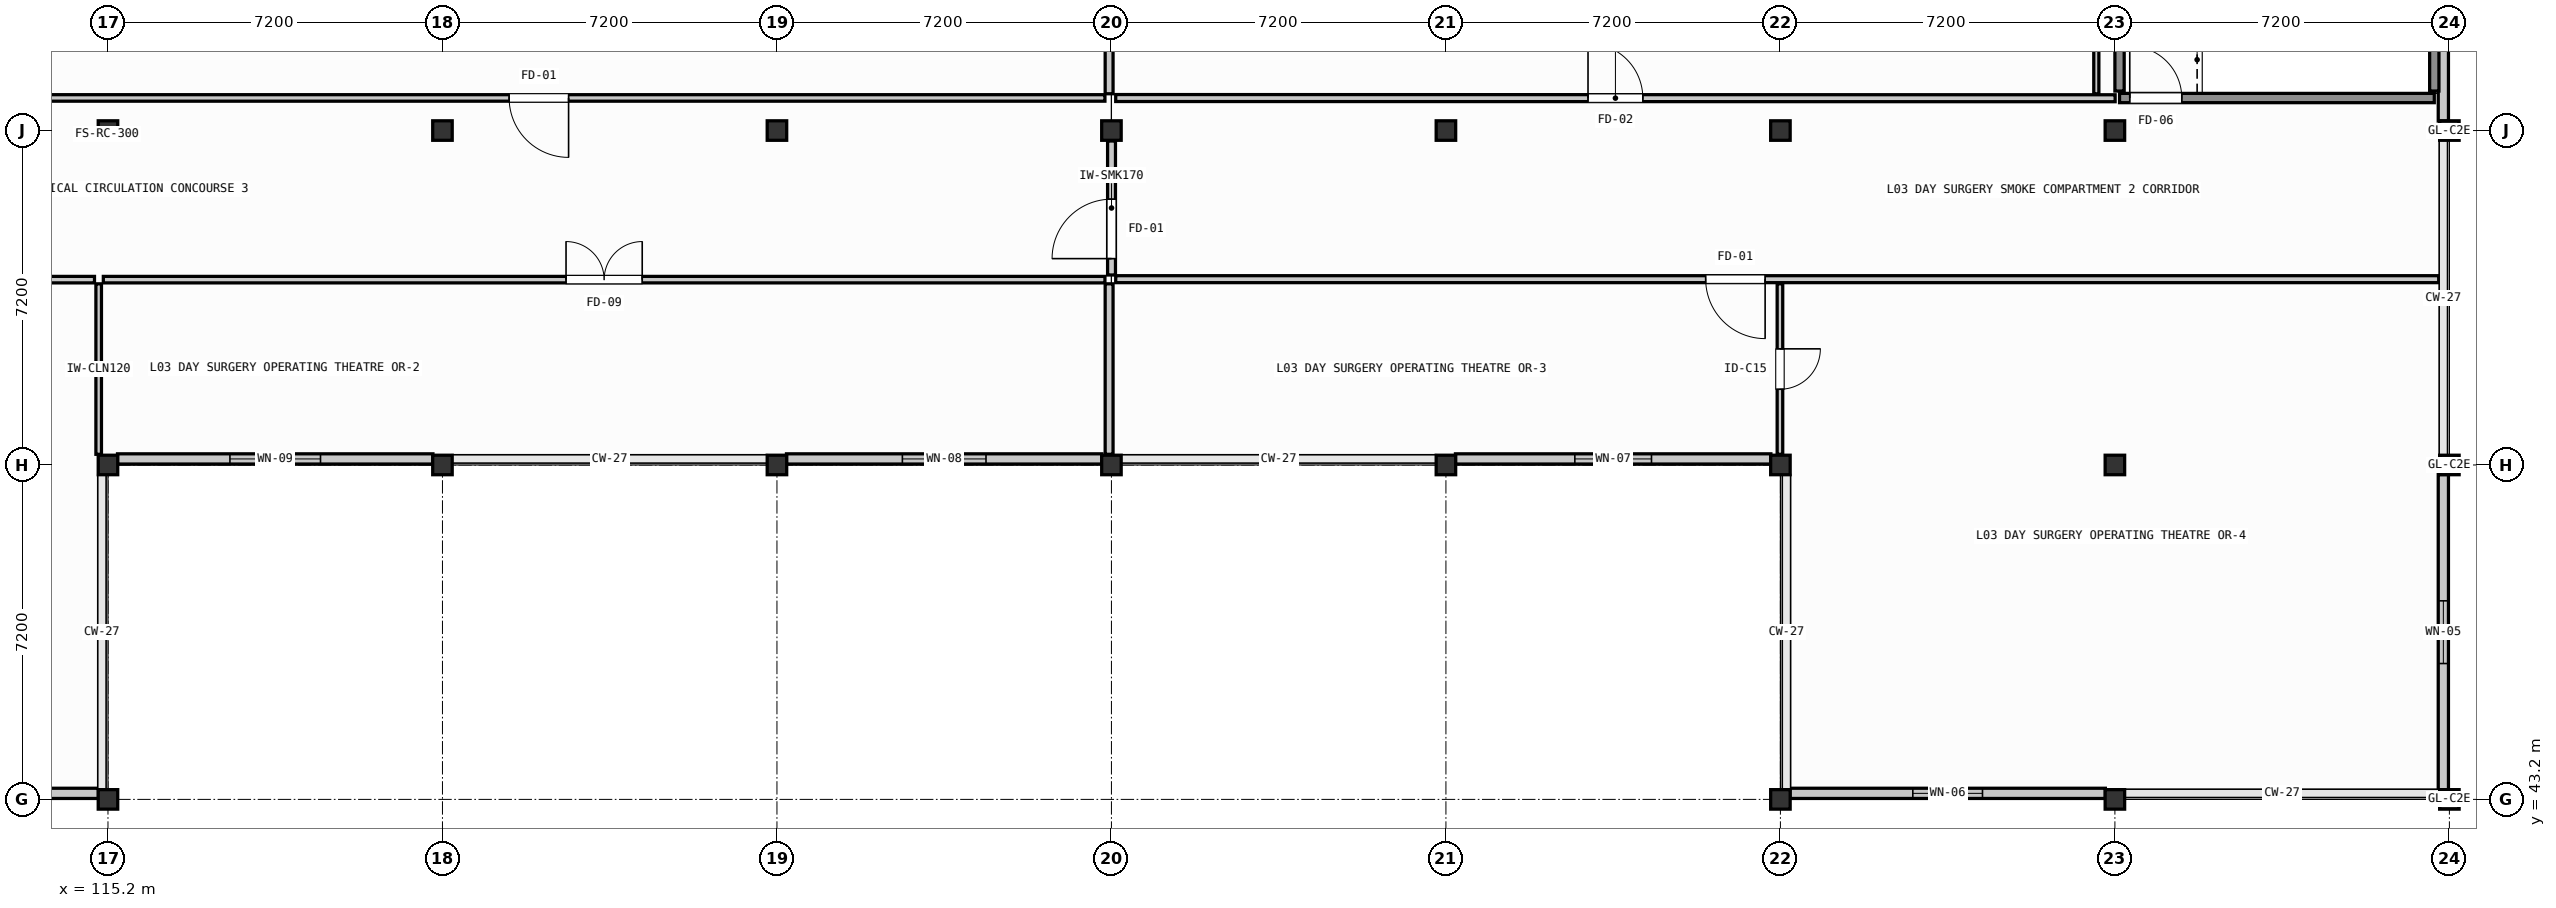
"""IFC4 building model, lengths in metres.
Left out: names, types, materials, properties, quantities, classifications, styles, units other than length and angle.
Written with IfcOpenShell. Run it as: python <this file> out.ifc"""

import sys

from ifc_helpers import new_model, si_unit, direction, frame, frame_2d, origin, origin_2d, place, context, subcontext, project, spatial, rectangle, extrude, element, fill, save


model = new_model("IFC4")
c1 = context("Model", 3, precision=1e-05, world=origin(), true_north=direction((0.0, 1.0)))
c2 = subcontext(c1, "Body", "Model", "MODEL_VIEW")
j1 = project(units=[si_unit("LENGTHUNIT", "METRE"), si_unit("PLANEANGLEUNIT", "RADIAN")], contexts=[c1])
p1 = place(None, origin())
s1 = spatial("IfcSite", under=j1, at=p1, CompositionType="ELEMENT")
p2 = place(p1, origin())
s2 = spatial("IfcBuilding", under=s1, at=p2, CompositionType="ELEMENT")
p3 = place(p2, frame((0.0, 0.0, 9.3)))
s3 = spatial("IfcBuildingStorey", under=s2, at=p3, CompositionType="ELEMENT", Elevation=9.3)
for number, where, z_axis, x_axis in (
    (1, (115.2, 43.2, 0.0), (0.0, 0.0, 1.0), (1.0, 0.0, 0.0)),
    (2, (115.2, 50.4, 0.0), (0.0, 0.0, 1.0), (1.0, 0.0, 0.0)),
    (3, (115.2, 57.6, 0.0), (0.0, 0.0, 1.0), (1.0, 0.0, 0.0)),
    (4, (122.4, 50.4, 0.0), (0.0, 0.0, 1.0), (1.0, 0.0, 0.0)),
    (5, (122.4, 57.6, 0.0), (0.0, 0.0, 1.0), (1.0, 0.0, 0.0)),
    (6, (129.6, 50.4, 0.0), (0.0, 0.0, 1.0), (1.0, 0.0, 0.0)),
    (7, (129.6, 57.6, 0.0), (0.0, 0.0, 1.0), (1.0, 0.0, 0.0)),
    (8, (136.8, 50.4, 0.0), (0.0, 0.0, 1.0), (1.0, 0.0, 0.0)),
    (9, (136.8, 57.6, 0.0), (0.0, 0.0, 1.0), (1.0, 0.0, 0.0)),
    (10, (144.0, 50.4, 0.0), (0.0, 0.0, 1.0), (1.0, 0.0, 0.0)),
    (11, (144.0, 57.6, 0.0), (0.0, 0.0, 1.0), (1.0, 0.0, 0.0)),
    (12, (151.2, 43.2, 0.0), (0.0, 0.0, 1.0), (1.0, 0.0, 0.0)),
    (13, (151.2, 50.4, 0.0), (0.0, 0.0, 1.0), (1.0, 0.0, 0.0)),
    (14, (151.2, 57.6, 0.0), (0.0, 0.0, 1.0), (1.0, 0.0, 0.0)),
    (15, (158.4, 43.2, 0.0), (0.0, 0.0, 1.0), (1.0, 0.0, 0.0)),
    (16, (158.4, 50.4, 0.0), (0.0, 0.0, 1.0), (1.0, 0.0, 0.0)),
    (17, (158.4, 57.6, 0.0), (0.0, 0.0, 1.0), (1.0, 0.0, 0.0)),
    (18, (165.6, 43.2, 0.0), (0.0, 0.0, 1.0), (1.0, 0.0, 0.0)),
    (19, (165.6, 50.4, 0.0), (0.0, 0.0, 1.0), (1.0, 0.0, 0.0)),
    (20, (165.6, 57.6, 0.0), (0.0, 0.0, 1.0), (1.0, 0.0, 0.0)),
):
    element("IfcColumn", number, at=place(p3, frame(where, z_axis=z_axis, x_axis=x_axis)), inside=s3, PredefinedType="COLUMN", context=c2, shape_type="SweptSolid", body=[
        extrude(rectangle(XDim=0.42, YDim=0.42, at=origin_2d()), origin(), (0.0, 0.0, 1.0), 3.99),
    ])
p4 = place(p3, frame((165.47, 64.595, 0.0), z_axis=(0.0, 0.0, 1.0), x_axis=(0.0, -1.0, 0.0)))
e21 = element("IfcWall", 21, at=p4, inside=s3, PredefinedType="SOLIDWALL", context=c2, shape_type="SweptSolid", body=[
    extrude(rectangle(XDim=6.79, YDim=0.22, at=frame_2d((3.395, 0.0))), origin(), (0.0, 0.0, 1.0), 3.27),
])
p5 = place(p3, frame((165.47, 50.195, 0.0), z_axis=(0.0, 0.0, 1.0), x_axis=(0.0, -1.0, 0.0)))
e22 = element("IfcWall", 22, at=p5, inside=s3, PredefinedType="SOLIDWALL", context=c2, shape_type="SweptSolid", body=[
    extrude(rectangle(XDim=6.79, YDim=0.22, at=frame_2d((3.395, 0.0))), origin(), (0.0, 0.0, 1.0), 3.27),
])
p6 = place(p5, frame((2.72, 0.0, 2.1)))
e23 = element("IfcOpeningElement", 23, at=p6, cuts=e22, PredefinedType="OPENING", context=c2, shape_type="SweptSolid", body=[
    extrude(rectangle(XDim=1.35, YDim=0.65, at=frame_2d((0.675, 0.325))), frame((0.0, 0.12, 0.0), z_axis=(0.0, -1.0, 0.0), x_axis=(1.0, 0.0, 0.0)), (0.0, 0.0, 1.0), 0.24),
])
p7 = place(p3, frame((158.195, 43.33, 0.0), z_axis=(0.0, 0.0, 1.0), x_axis=(-1.0, 0.0, 0.0)))
e24 = element("IfcWall", 24, at=p7, inside=s3, PredefinedType="SOLIDWALL", context=c2, shape_type="SweptSolid", body=[
    extrude(rectangle(XDim=6.79, YDim=0.22, at=frame_2d((3.395, 0.0))), origin(), (0.0, 0.0, 1.0), 3.27),
])
p8 = place(p7, frame((2.645, 0.0, 2.1)))
e25 = element("IfcOpeningElement", 25, at=p8, cuts=e24, PredefinedType="OPENING", context=c2, shape_type="SweptSolid", body=[
    extrude(rectangle(XDim=1.5, YDim=0.65, at=frame_2d((0.75, 0.325))), frame((0.0, 0.12, 0.0), z_axis=(0.0, -1.0, 0.0), x_axis=(1.0, 0.0, 0.0)), (0.0, 0.0, 1.0), 0.24),
])
p9 = place(p3, frame((150.995, 50.53, 0.0), z_axis=(0.0, 0.0, 1.0), x_axis=(-1.0, 0.0, 0.0)))
e26 = element("IfcWall", 26, at=p9, inside=s3, PredefinedType="SOLIDWALL", context=c2, shape_type="SweptSolid", body=[
    extrude(rectangle(XDim=6.79, YDim=0.22, at=frame_2d((3.395, 0.0))), origin(), (0.0, 0.0, 1.0), 3.27),
])
p10 = place(p9, frame((2.57, 0.0, 2.1)))
e27 = element("IfcOpeningElement", 27, at=p10, cuts=e26, PredefinedType="OPENING", context=c2, shape_type="SweptSolid", body=[
    extrude(rectangle(XDim=1.65, YDim=0.65, at=frame_2d((0.825, 0.325))), frame((0.0, 0.12, 0.0), z_axis=(0.0, -1.0, 0.0), x_axis=(1.0, 0.0, 0.0)), (0.0, 0.0, 1.0), 0.24),
])
p11 = place(p3, frame((136.595, 50.53, 0.0), z_axis=(0.0, 0.0, 1.0), x_axis=(-1.0, 0.0, 0.0)))
e28 = element("IfcWall", 28, at=p11, inside=s3, PredefinedType="SOLIDWALL", context=c2, shape_type="SweptSolid", body=[
    extrude(rectangle(XDim=6.79, YDim=0.22, at=frame_2d((3.395, 0.0))), origin(), (0.0, 0.0, 1.0), 3.27),
])
p12 = place(p11, frame((2.495, 0.0, 2.1)))
e29 = element("IfcOpeningElement", 29, at=p12, cuts=e28, PredefinedType="OPENING", context=c2, shape_type="SweptSolid", body=[
    extrude(rectangle(XDim=1.8, YDim=0.65, at=frame_2d((0.9, 0.325))), frame((0.0, 0.12, 0.0), z_axis=(0.0, -1.0, 0.0), x_axis=(1.0, 0.0, 0.0)), (0.0, 0.0, 1.0), 0.24),
])
p13 = place(p3, frame((122.195, 50.53, 0.0), z_axis=(0.0, 0.0, 1.0), x_axis=(-1.0, 0.0, 0.0)))
e30 = element("IfcWall", 30, at=p13, inside=s3, PredefinedType="SOLIDWALL", context=c2, shape_type="SweptSolid", body=[
    extrude(rectangle(XDim=6.79, YDim=0.22, at=frame_2d((3.395, 0.0))), origin(), (0.0, 0.0, 1.0), 3.27),
])
p14 = place(p13, frame((2.42, 0.0, 2.1)))
e31 = element("IfcOpeningElement", 31, at=p14, cuts=e30, PredefinedType="OPENING", context=c2, shape_type="SweptSolid", body=[
    extrude(rectangle(XDim=1.95, YDim=0.65, at=frame_2d((0.975, 0.325))), frame((0.0, 0.12, 0.0), z_axis=(0.0, -1.0, 0.0), x_axis=(1.0, 0.0, 0.0)), (0.0, 0.0, 1.0), 0.24),
])
p15 = place(p3, frame((114.995, 43.33, 0.0), z_axis=(0.0, 0.0, 1.0), x_axis=(-1.0, 0.0, 0.0)))
e32 = element("IfcWall", 32, at=p15, inside=s3, PredefinedType="SOLIDWALL", context=c2, shape_type="SweptSolid", body=[
    extrude(rectangle(XDim=6.79, YDim=0.22, at=frame_2d((3.395, 0.0))), origin(), (0.0, 0.0, 1.0), 3.27),
])
p16 = place(p15, frame((2.345, 0.0, 2.1)))
e33 = element("IfcOpeningElement", 33, at=p16, cuts=e32, PredefinedType="OPENING", context=c2, shape_type="SweptSolid", body=[
    extrude(rectangle(XDim=2.1, YDim=0.65, at=frame_2d((1.05, 0.325))), frame((0.0, 0.12, 0.0), z_axis=(0.0, -1.0, 0.0), x_axis=(1.0, 0.0, 0.0)), (0.0, 0.0, 1.0), 0.24),
])
p17 = place(p3, frame((158.5, 58.3, 0.0), z_axis=(0.0, 0.0, 1.0), x_axis=(1.0, 0.0, 0.0)))
e34 = element("IfcWall", 34, at=p17, inside=s3, PredefinedType="SHEAR", context=c2, shape_type="SweptSolid", body=[
    extrude(rectangle(XDim=6.775, YDim=0.2, at=frame_2d((3.387, 0.0))), origin(), (0.0, 0.0, 1.0), 3.975),
])
p18 = place(p17, frame((0.22, 0.0, 0.0)))
e35 = element("IfcOpeningElement", 35, at=p18, cuts=e34, PredefinedType="OPENING", context=c2, shape_type="SweptSolid", body=[
    extrude(rectangle(XDim=1.12, YDim=2.14, at=frame_2d((0.56, 1.07))), frame((0.0, 0.11, 0.0), z_axis=(0.0, -1.0, 0.0), x_axis=(1.0, 0.0, 0.0)), (0.0, 0.0, 1.0), 0.22),
])
for number, where, z_axis, x_axis in (
    (36, (158.5, 58.45, 0.0), (0.0, 0.0, 1.0), (0.0, 1.0, 0.0)),
    (37, (165.275, 58.45, 0.0), (0.0, 0.0, 1.0), (0.0, 1.0, 0.0)),
):
    element("IfcWall", number, at=place(p3, frame(where, z_axis=z_axis, x_axis=x_axis)), inside=s3, PredefinedType="SHEAR", context=c2, shape_type="SweptSolid", body=[
        extrude(rectangle(XDim=2.6, YDim=0.2, at=frame_2d((1.3, 0.0))), origin(), (0.0, 0.0, 1.0), 3.975),
    ])
p19 = place(p3, frame((136.802, 54.49, 0.0), z_axis=(0.0, 0.0, 1.0), x_axis=(0.0, 1.0, 0.0)))
e38 = element("IfcWall", 38, at=p19, inside=s3, PredefinedType="PARTITIONING", context=c2, shape_type="SweptSolid", body=[
    extrude(rectangle(XDim=2.885, YDim=0.17, at=frame_2d((1.442, 0.0))), origin(), (0.0, 0.0, 1.0), 3.27),
])
p20 = place(p19, frame((0.353, 0.0, 0.0)))
e39 = element("IfcOpeningElement", 39, at=p20, cuts=e38, PredefinedType="OPENING", context=c2, shape_type="SweptSolid", body=[
    extrude(rectangle(XDim=1.28, YDim=2.18, at=frame_2d((0.64, 1.09))), frame((0.0, 0.095, 0.0), z_axis=(0.0, -1.0, 0.0), x_axis=(1.0, 0.0, 0.0)), (0.0, 0.0, 1.0), 0.19),
])
p21 = place(p3, frame((136.892, 58.3, 0.0), z_axis=(0.0, 0.0, 1.0), x_axis=(0.999999976754, -0.000215619959, 0.0)))
e40 = element("IfcWall", 40, at=p21, inside=s3, PredefinedType="PARTITIONING", context=c2, shape_type="SweptSolid", body=[
    extrude(rectangle(XDim=21.513, YDim=0.15, at=frame_2d((10.757, 0.0))), origin(), (0.0, 0.0, 1.0), 3.35),
])
p22 = place(p21, frame((10.167, 0.0, 0.0)))
e41 = element("IfcOpeningElement", 41, at=p22, cuts=e40, PredefinedType="OPENING", context=c2, shape_type="SweptSolid", body=[
    extrude(rectangle(XDim=1.18, YDim=2.16, at=frame_2d((0.59, 1.08))), frame((0.0, 0.085, 0.0), z_axis=(0.0, -1.0, 0.0), x_axis=(1.0, 0.0, 0.0)), (0.0, 0.0, 1.0), 0.17),
])
p23 = place(p3, frame((165.37, 54.4, 0.0), z_axis=(0.0, 0.0, 1.0), x_axis=(-1.0, 0.0, 0.0)))
e42 = element("IfcWall", 42, at=p23, inside=s3, PredefinedType="PARTITIONING", context=c2, shape_type="SweptSolid", body=[
    extrude(rectangle(XDim=28.478, YDim=0.15, at=frame_2d((14.239, 0.0))), origin(), (0.0, 0.0, 1.0), 3.35),
])
p24 = place(p23, frame((14.499, 0.0, 0.0)))
e43 = element("IfcOpeningElement", 43, at=p24, cuts=e42, PredefinedType="OPENING", context=c2, shape_type="SweptSolid", body=[
    extrude(rectangle(XDim=1.28, YDim=2.18, at=frame_2d((0.64, 1.09))), frame((0.0, 0.085, 0.0), z_axis=(0.0, -1.0, 0.0), x_axis=(1.0, 0.0, 0.0)), (0.0, 0.0, 1.0), 0.17),
])
p25 = place(p3, frame((101.03, 54.39, 0.0), z_axis=(0.0, 0.0, 1.0), x_axis=(1.0, 0.0, 0.0)))
e44 = element("IfcWall", 44, at=p25, inside=s3, PredefinedType="PARTITIONING", context=c2, shape_type="SweptSolid", body=[
    extrude(rectangle(XDim=13.88, YDim=0.14, at=frame_2d((6.94, 0.0))), origin(), (0.0, 0.0, 1.0), 3.35),
])
p26 = place(p25, frame((6.47, 0.0, 0.0)))
e45 = element("IfcOpeningElement", 45, at=p26, cuts=e44, PredefinedType="OPENING", context=c2, shape_type="SweptSolid", body=[
    extrude(rectangle(XDim=0.94, YDim=2.1, at=frame_2d((0.47, 1.05))), frame((0.0, 0.08, 0.0), z_axis=(0.0, -1.0, 0.0), x_axis=(1.0, 0.0, 0.0)), (0.0, 0.0, 1.0), 0.16),
])
p27 = place(p3, frame((115.0, 54.3, 0.0), z_axis=(0.0, 0.0, 1.0), x_axis=(0.0, -1.0, 0.0)))
e46 = element("IfcWall", 46, at=p27, inside=s3, PredefinedType="PARTITIONING", context=c2, shape_type="SweptSolid", body=[
    extrude(rectangle(XDim=3.671, YDim=0.12, at=frame_2d((1.835, 0.0))), origin(), (0.0, 0.0, 1.0), 3.27),
])
p28 = place(p3, frame((115.1, 54.39, 0.0), z_axis=(0.0, 0.0, 1.0), x_axis=(1.0, 0.0, 0.0)))
e47 = element("IfcWall", 47, at=p28, inside=s3, PredefinedType="PARTITIONING", context=c2, shape_type="SweptSolid", body=[
    extrude(rectangle(XDim=21.56, YDim=0.14, at=frame_2d((10.78, 0.0))), origin(), (0.0, 0.0, 1.0), 3.35),
])
p29 = place(p28, frame((9.96, 0.0, 0.0)))
e48 = element("IfcOpeningElement", 48, at=p29, cuts=e47, PredefinedType="OPENING", context=c2, shape_type="SweptSolid", body=[
    extrude(rectangle(XDim=1.64, YDim=2.24, at=frame_2d((0.82, 1.12))), frame((0.0, 0.08, 0.0), z_axis=(0.0, -1.0, 0.0), x_axis=(1.0, 0.0, 0.0)), (0.0, 0.0, 1.0), 0.16),
])
p30 = place(p3, frame((136.75, 54.3, 0.0), z_axis=(0.0, 0.0, 1.0), x_axis=(0.0, -1.0, 0.0)))
e49 = element("IfcWall", 49, at=p30, inside=s3, PredefinedType="PARTITIONING", context=c2, shape_type="SweptSolid", body=[
    extrude(rectangle(XDim=3.67, YDim=0.17, at=frame_2d((1.835, 0.0))), origin(), (0.0, 0.0, 1.0), 3.27),
])
p31 = place(p3, frame((136.75, 64.57, 0.0), z_axis=(0.0, 0.0, 1.0), x_axis=(0.0, -1.0, 0.0)))
e50 = element("IfcWall", 50, at=p31, inside=s3, PredefinedType="PARTITIONING", context=c2, shape_type="SweptSolid", body=[
    extrude(rectangle(XDim=6.178, YDim=0.17, at=frame_2d((3.089, 0.0))), origin(), (0.0, 0.0, 1.0), 3.27),
])
p32 = place(p3, frame((136.66, 58.302, 0.0), z_axis=(0.0, 0.0, 1.0), x_axis=(-1.0, 0.0, 0.0)))
e51 = element("IfcWall", 51, at=p32, inside=s3, PredefinedType="PARTITIONING", context=c2, shape_type="SweptSolid", body=[
    extrude(rectangle(XDim=27.97, YDim=0.14, at=frame_2d((13.985, 0.0))), origin(), (0.0, 0.0, 1.0), 3.35),
])
p33 = place(p32, frame((11.545, 0.0, 0.0)))
e52 = element("IfcOpeningElement", 52, at=p33, cuts=e51, PredefinedType="OPENING", context=c2, shape_type="SweptSolid", body=[
    extrude(rectangle(XDim=1.28, YDim=2.18, at=frame_2d((0.64, 1.09))), frame((0.0, 0.08, 0.0), z_axis=(0.0, -1.0, 0.0), x_axis=(1.0, 0.0, 0.0)), (0.0, 0.0, 1.0), 0.16),
])
p34 = place(p3, frame((151.19, 54.3, 0.0), z_axis=(0.0, 0.0, 1.0), x_axis=(0.0, -1.0, 0.0)))
e53 = element("IfcWall", 53, at=p34, inside=s3, PredefinedType="PARTITIONING", context=c2, shape_type="SweptSolid", body=[
    extrude(rectangle(XDim=3.67, YDim=0.12, at=frame_2d((1.835, 0.0))), origin(), (0.0, 0.0, 1.0), 3.27),
])
p35 = place(p34, frame((1.4, 0.0, 0.0)))
e54 = element("IfcOpeningElement", 54, at=p35, cuts=e53, PredefinedType="OPENING", context=c2, shape_type="SweptSolid", body=[
    extrude(rectangle(XDim=0.87, YDim=2.14, at=frame_2d((0.435, 1.07))), frame((0.0, 0.07, 0.0), z_axis=(0.0, -1.0, 0.0), x_axis=(1.0, 0.0, 0.0)), (0.0, 0.0, 1.0), 0.14),
])
p36 = place(p3, frame((158.0, 64.55, 0.0), z_axis=(0.0, 0.0, 1.0), x_axis=(0.0, -1.0, 0.0)))
e55 = element("IfcWall", 55, at=p36, inside=s3, PredefinedType="PARTITIONING", context=c2, shape_type="SweptSolid", body=[
    extrude(rectangle(XDim=6.16, YDim=0.11, at=frame_2d((3.08, 0.0))), origin(), (0.0, 0.0, 1.0), 3.27),
])
p37 = place(p6, origin())
e56 = element("IfcWindow", 56, at=p37, inside=s3, PartitioningType="SINGLE_PANEL", PredefinedType="WINDOW", context=c2, shape_type="SweptSolid", body=[
    extrude(rectangle(XDim=1.35, YDim=0.65, at=frame_2d((0.675, 0.325))), frame((0.0, 0.03, 0.0), z_axis=(0.0, -1.0, 0.0), x_axis=(1.0, 0.0, 0.0)), (0.0, 0.0, 1.0), 0.06),
])
fill(e23, e56)
p38 = place(p8, origin())
e57 = element("IfcWindow", 57, at=p38, inside=s3, PartitioningType="SINGLE_PANEL", PredefinedType="WINDOW", context=c2, shape_type="SweptSolid", body=[
    extrude(rectangle(XDim=1.5, YDim=0.65, at=frame_2d((0.75, 0.325))), frame((0.0, 0.03, 0.0), z_axis=(0.0, -1.0, 0.0), x_axis=(1.0, 0.0, 0.0)), (0.0, 0.0, 1.0), 0.06),
])
fill(e25, e57)
p39 = place(p10, origin())
e58 = element("IfcWindow", 58, at=p39, inside=s3, PartitioningType="SINGLE_PANEL", PredefinedType="WINDOW", context=c2, shape_type="SweptSolid", body=[
    extrude(rectangle(XDim=1.65, YDim=0.65, at=frame_2d((0.825, 0.325))), frame((0.0, 0.03, 0.0), z_axis=(0.0, -1.0, 0.0), x_axis=(1.0, 0.0, 0.0)), (0.0, 0.0, 1.0), 0.06),
])
fill(e27, e58)
p40 = place(p12, origin())
e59 = element("IfcWindow", 59, at=p40, inside=s3, PartitioningType="SINGLE_PANEL", PredefinedType="WINDOW", context=c2, shape_type="SweptSolid", body=[
    extrude(rectangle(XDim=1.8, YDim=0.65, at=frame_2d((0.9, 0.325))), frame((0.0, 0.03, 0.0), z_axis=(0.0, -1.0, 0.0), x_axis=(1.0, 0.0, 0.0)), (0.0, 0.0, 1.0), 0.06),
])
fill(e29, e59)
p41 = place(p14, origin())
e60 = element("IfcWindow", 60, at=p41, inside=s3, PartitioningType="SINGLE_PANEL", PredefinedType="WINDOW", context=c2, shape_type="SweptSolid", body=[
    extrude(rectangle(XDim=1.95, YDim=0.65, at=frame_2d((0.975, 0.325))), frame((0.0, 0.03, 0.0), z_axis=(0.0, -1.0, 0.0), x_axis=(1.0, 0.0, 0.0)), (0.0, 0.0, 1.0), 0.06),
])
fill(e31, e60)
p42 = place(p18, origin())
e61 = element("IfcDoor", 61, at=p42, inside=s3, OperationType="SINGLE_SWING_LEFT", PredefinedType="DOOR", context=c2, shape_type="SweptSolid", body=[
    extrude(rectangle(XDim=1.12, YDim=2.14, at=frame_2d((0.56, 1.07))), frame((0.0, 0.025, 0.0), z_axis=(0.0, -1.0, 0.0), x_axis=(1.0, 0.0, 0.0)), (0.0, 0.0, 1.0), 0.05),
])
fill(e35, e61)
p43 = place(p20, origin())
e62 = element("IfcDoor", 62, at=p43, inside=s3, OperationType="SINGLE_SWING_LEFT", PredefinedType="DOOR", context=c2, shape_type="SweptSolid", body=[
    extrude(rectangle(XDim=1.28, YDim=2.18, at=frame_2d((0.64, 1.09))), frame((0.0, 0.025, 0.0), z_axis=(0.0, -1.0, 0.0), x_axis=(1.0, 0.0, 0.0)), (0.0, 0.0, 1.0), 0.05),
])
fill(e39, e62)
p44 = place(p29, origin())
e63 = element("IfcDoor", 63, at=p44, inside=s3, OperationType="DOUBLE_DOOR_SINGLE_SWING", PredefinedType="DOOR", context=c2, shape_type="SweptSolid", body=[
    extrude(rectangle(XDim=1.64, YDim=2.24, at=frame_2d((0.82, 1.12))), frame((0.0, 0.025, 0.0), z_axis=(0.0, -1.0, 0.0), x_axis=(1.0, 0.0, 0.0)), (0.0, 0.0, 1.0), 0.05),
])
fill(e48, e63)
p45 = place(p33, origin())
e64 = element("IfcDoor", 64, at=p45, inside=s3, OperationType="SINGLE_SWING_RIGHT", PredefinedType="DOOR", context=c2, shape_type="SweptSolid", body=[
    extrude(rectangle(XDim=1.28, YDim=2.18, at=frame_2d((0.64, 1.09))), frame((0.0, 0.025, 0.0), z_axis=(0.0, -1.0, 0.0), x_axis=(1.0, 0.0, 0.0)), (0.0, 0.0, 1.0), 0.05),
])
fill(e52, e64)
p46 = place(p24, origin())
e65 = element("IfcDoor", 65, at=p46, inside=s3, OperationType="SINGLE_SWING_LEFT", PredefinedType="DOOR", context=c2, shape_type="SweptSolid", body=[
    extrude(rectangle(XDim=1.28, YDim=2.18, at=frame_2d((0.64, 1.09))), frame((0.0, 0.025, 0.0), z_axis=(0.0, -1.0, 0.0), x_axis=(1.0, 0.0, 0.0)), (0.0, 0.0, 1.0), 0.05),
])
fill(e43, e65)
p47 = place(p35, origin())
e66 = element("IfcDoor", 66, at=p47, inside=s3, OperationType="SINGLE_SWING_RIGHT", PredefinedType="DOOR", context=c2, shape_type="SweptSolid", body=[
    extrude(rectangle(XDim=0.87, YDim=2.14, at=frame_2d((0.435, 1.07))), frame((0.0, 0.025, 0.0), z_axis=(0.0, -1.0, 0.0), x_axis=(1.0, 0.0, 0.0)), (0.0, 0.0, 1.0), 0.05),
])
fill(e54, e66)
p48 = place(p22, origin())
e67 = element("IfcDoor", 67, at=p48, inside=s3, OperationType="SINGLE_SWING_LEFT", PredefinedType="DOOR", context=c2, shape_type="SweptSolid", body=[
    extrude(rectangle(XDim=1.18, YDim=2.16, at=frame_2d((0.59, 1.08))), frame((0.0, 0.025, 0.0), z_axis=(0.0, -1.0, 0.0), x_axis=(1.0, 0.0, 0.0)), (0.0, 0.0, 1.0), 0.05),
])
fill(e41, e67)
save(model, sys.argv[1])
